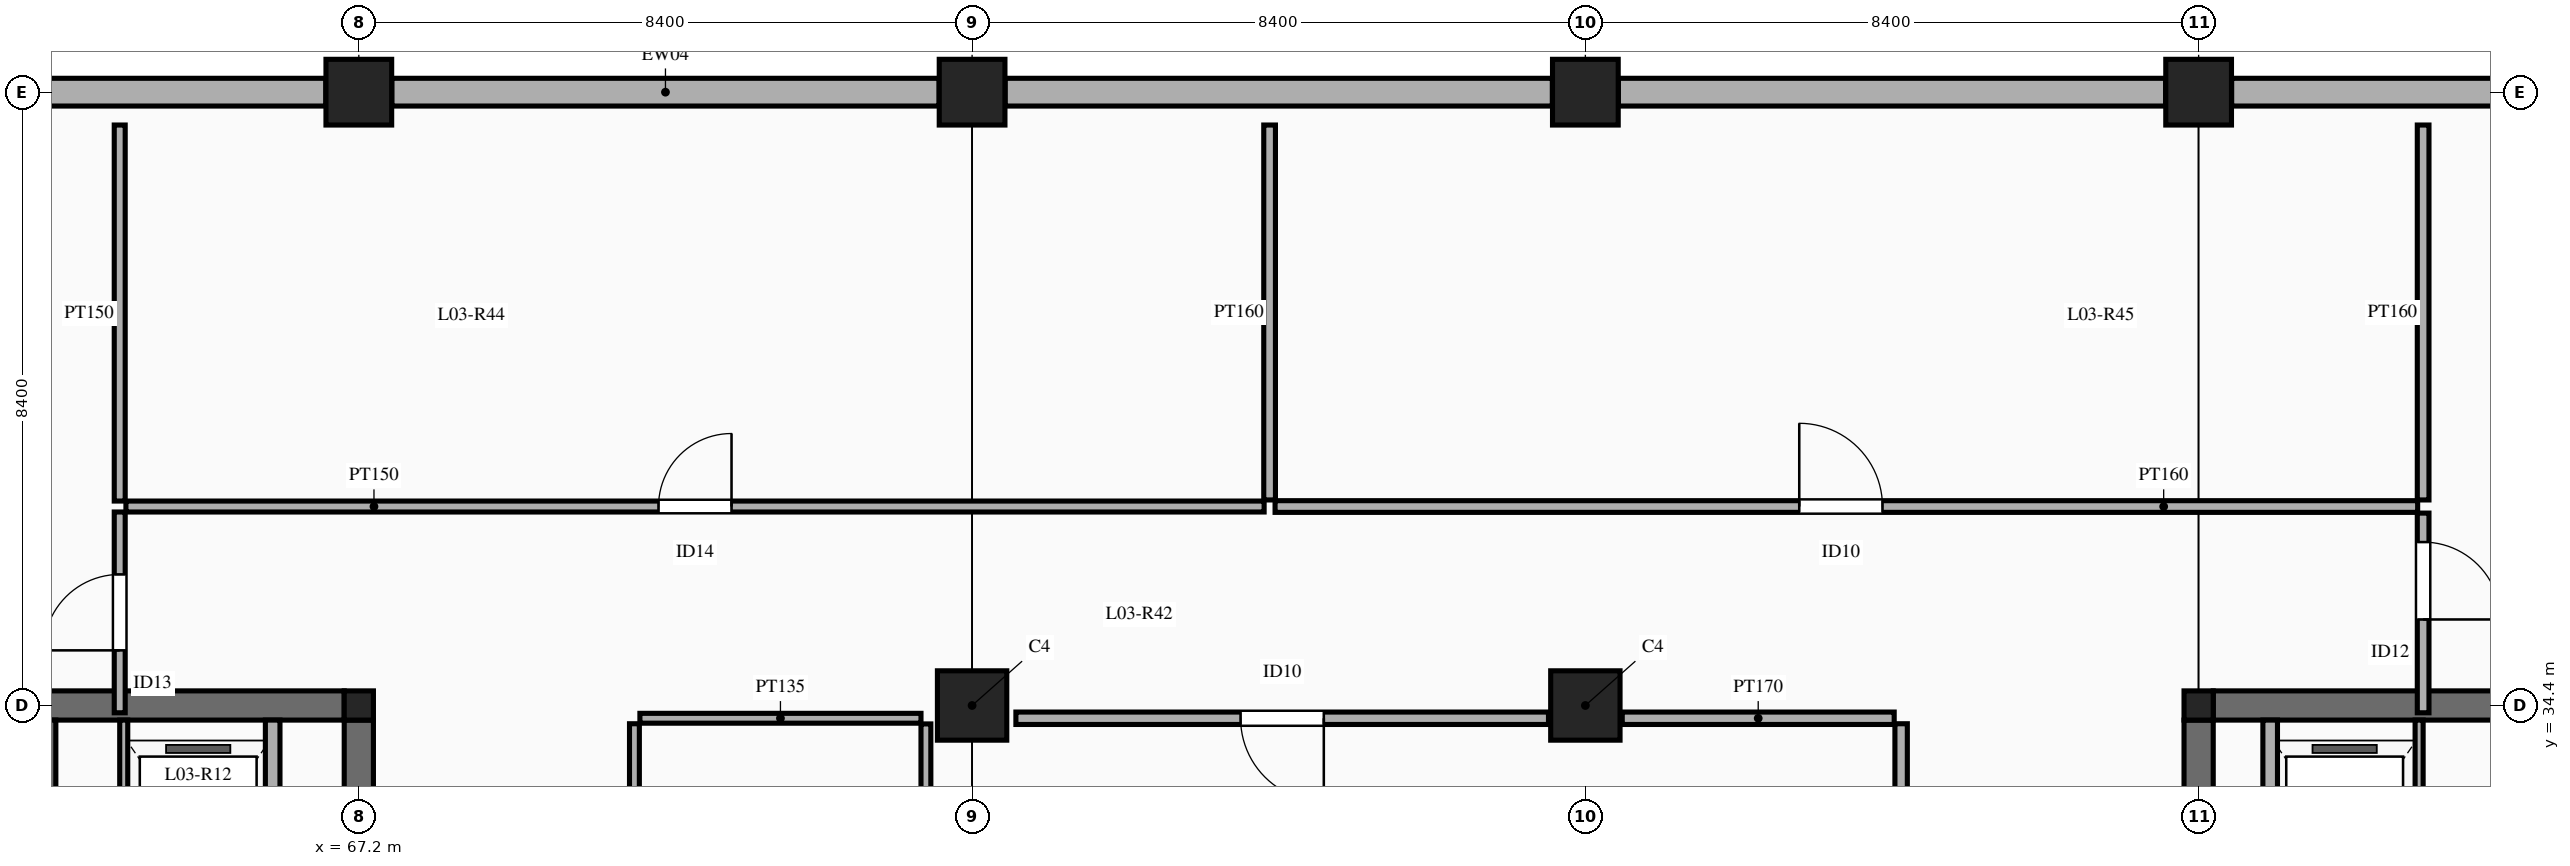
"""IFC4 building model, lengths in metres.
Left out: names, types, materials, properties, quantities, classifications, styles, units other than length and angle.
Written with IfcOpenShell. Run it as: python <this file> out.ifc"""

import sys

from ifc_helpers import new_model, si_unit, direction, frame, frame_2d, origin, origin_2d, place, context, subcontext, project, spatial, rectangle, extrude, element, fill, save


model = new_model("IFC4")
c1 = context("Model", 3, precision=1e-05, world=origin(), true_north=direction((0.0, 1.0)))
c2 = subcontext(c1, "Body", "Model", "MODEL_VIEW")
j1 = project(units=[si_unit("LENGTHUNIT", "METRE"), si_unit("PLANEANGLEUNIT", "RADIAN")], contexts=[c1])
p1 = place(None, origin())
s1 = spatial("IfcSite", under=j1, at=p1, CompositionType="ELEMENT")
p2 = place(p1, origin())
s2 = spatial("IfcBuilding", under=s1, at=p2, CompositionType="ELEMENT")
p3 = place(p2, frame((0.0, 0.0, 15.0)))
s3 = spatial("IfcBuildingStorey", under=s2, at=p3, CompositionType="ELEMENT", Elevation=15.0)
p4 = place(p3, frame((67.2, 34.4, 0.0), z_axis=(0.0, 0.0, 1.0), x_axis=(1.0, 0.0, 0.0)))
e1 = element("IfcColumn", 1, at=p4, inside=s3, PredefinedType="COLUMN", context=c2, shape_type="SweptSolid", body=[
    extrude(rectangle(XDim=0.4, YDim=0.4, at=origin_2d()), origin(), (0.0, 0.0, 1.0), 4.5),
])
p5 = place(p3, frame((67.2, 42.8, 0.0), z_axis=(0.0, 0.0, 1.0), x_axis=(1.0, 0.0, 0.0)))
e2 = element("IfcColumn", 2, at=p5, inside=s3, PredefinedType="COLUMN", context=c2, shape_type="SweptSolid", body=[
    extrude(rectangle(XDim=0.9, YDim=0.9, at=origin_2d()), origin(), (0.0, 0.0, 1.0), 4.5),
])
p6 = place(p3, frame((75.6, 34.4, 0.0), z_axis=(0.0, 0.0, 1.0), x_axis=(1.0, 0.0, 0.0)))
e3 = element("IfcColumn", 3, at=p6, inside=s3, PredefinedType="COLUMN", context=c2, shape_type="SweptSolid", body=[
    extrude(rectangle(XDim=0.95, YDim=0.95, at=origin_2d()), origin(), (0.0, 0.0, 1.0), 4.5),
])
p7 = place(p3, frame((75.6, 42.8, 0.0), z_axis=(0.0, 0.0, 1.0), x_axis=(1.0, 0.0, 0.0)))
e4 = element("IfcColumn", 4, at=p7, inside=s3, PredefinedType="COLUMN", context=c2, shape_type="SweptSolid", body=[
    extrude(rectangle(XDim=0.9, YDim=0.9, at=origin_2d()), origin(), (0.0, 0.0, 1.0), 4.5),
])
p8 = place(p3, frame((84.0, 34.4, 0.0), z_axis=(0.0, 0.0, 1.0), x_axis=(1.0, 0.0, 0.0)))
e5 = element("IfcColumn", 5, at=p8, inside=s3, PredefinedType="COLUMN", context=c2, shape_type="SweptSolid", body=[
    extrude(rectangle(XDim=0.95, YDim=0.95, at=origin_2d()), origin(), (0.0, 0.0, 1.0), 4.5),
])
p9 = place(p3, frame((84.0, 42.8, 0.0), z_axis=(0.0, 0.0, 1.0), x_axis=(1.0, 0.0, 0.0)))
e6 = element("IfcColumn", 6, at=p9, inside=s3, PredefinedType="COLUMN", context=c2, shape_type="SweptSolid", body=[
    extrude(rectangle(XDim=0.9, YDim=0.9, at=origin_2d()), origin(), (0.0, 0.0, 1.0), 4.5),
])
p10 = place(p3, frame((92.4, 34.4, 0.0), z_axis=(0.0, 0.0, 1.0), x_axis=(1.0, 0.0, 0.0)))
e7 = element("IfcColumn", 7, at=p10, inside=s3, PredefinedType="COLUMN", context=c2, shape_type="SweptSolid", body=[
    extrude(rectangle(XDim=0.4, YDim=0.4, at=origin_2d()), origin(), (0.0, 0.0, 1.0), 4.5),
])
p11 = place(p3, frame((92.4, 42.8, 0.0), z_axis=(0.0, 0.0, 1.0), x_axis=(1.0, 0.0, 0.0)))
e8 = element("IfcColumn", 8, at=p11, inside=s3, PredefinedType="COLUMN", context=c2, shape_type="SweptSolid", body=[
    extrude(rectangle(XDim=0.9, YDim=0.9, at=origin_2d()), origin(), (0.0, 0.0, 1.0), 4.5),
])
for number, where, z_axis, x_axis in (
    (9, (67.2, 26.2, 0.0), (0.0, 0.0, 1.0), (0.0, 1.0, 0.0)),
    (10, (59.0, 34.4, 0.0), (0.0, 0.0, 1.0), (1.0, 0.0, 0.0)),
    (11, (92.4, 26.2, 0.0), (0.0, 0.0, 1.0), (0.0, 1.0, 0.0)),
    (12, (92.6, 34.4, 0.0), (0.0, 0.0, 1.0), (1.0, 0.0, 0.0)),
):
    element("IfcWall", number, at=place(p3, frame(where, z_axis=z_axis, x_axis=x_axis)), inside=s3, PredefinedType="SHEAR", context=c2, shape_type="SweptSolid", body=[
        extrude(rectangle(XDim=8.0, YDim=0.4, at=frame_2d((4.0, 0.0))), origin(), (0.0, 0.0, 1.0), 4.5),
    ])
p12 = place(p3, frame((59.252, 42.8, 0.0), z_axis=(0.0, 0.0, 1.0), x_axis=(1.0, 0.0, 0.0)))
e13 = element("IfcWall", 13, at=p12, inside=s3, PredefinedType="SOLIDWALL", context=c2, shape_type="SweptSolid", body=[
    extrude(rectangle(XDim=7.496, YDim=0.38, at=frame_2d((3.748, 0.0))), origin(), (0.0, 0.0, 1.0), 3.55),
])
p13 = place(p3, frame((67.652, 42.8, 0.0), z_axis=(0.0, 0.0, 1.0), x_axis=(1.0, 0.0, 0.0)))
e14 = element("IfcWall", 14, at=p13, inside=s3, PredefinedType="SOLIDWALL", context=c2, shape_type="SweptSolid", body=[
    extrude(rectangle(XDim=7.496, YDim=0.38, at=frame_2d((3.748, 0.0))), origin(), (0.0, 0.0, 1.0), 3.55),
])
for number, where, z_axis, x_axis in (
    (15, (76.052, 42.8, 0.0), (0.0, 0.0, 1.0), (1.0, 0.0, 0.0)),
    (16, (84.452, 42.8, 0.0), (0.0, 0.0, 1.0), (1.0, 0.0, 0.0)),
):
    element("IfcWall", number, at=place(p3, frame(where, z_axis=z_axis, x_axis=x_axis)), inside=s3, PredefinedType="SOLIDWALL", context=c2, shape_type="SweptSolid", body=[
        extrude(rectangle(XDim=7.496, YDim=0.38, at=frame_2d((3.748, 0.0))), origin(), (0.0, 0.0, 1.0), 3.55),
    ])
p14 = place(p3, frame((92.852, 42.8, 0.0), z_axis=(0.0, 0.0, 1.0), x_axis=(1.0, 0.0, 0.0)))
e17 = element("IfcWall", 17, at=p14, inside=s3, PredefinedType="SOLIDWALL", context=c2, shape_type="SweptSolid", body=[
    extrude(rectangle(XDim=7.496, YDim=0.38, at=frame_2d((3.748, 0.0))), origin(), (0.0, 0.0, 1.0), 3.55),
])
p15 = place(p3, frame((62.95, 26.1, 0.0), z_axis=(0.0, 0.0, 1.0), x_axis=(0.0, 1.0, 0.0)))
e18 = element("IfcWall", 18, at=p15, inside=s3, PredefinedType="SOLIDWALL", context=c2, shape_type="SweptSolid", body=[
    extrude(rectangle(XDim=8.1, YDim=0.2, at=frame_2d((4.05, 0.0))), origin(), (0.0, 0.0, 1.0), 4.25),
])
p16 = place(p15, frame((0.45, 0.0, 0.0)))
e19 = element("IfcOpeningElement", 19, at=p16, cuts=e18, PredefinedType="OPENING", context=c2, shape_type="SweptSolid", body=[
    extrude(rectangle(XDim=1.12, YDim=2.15, at=frame_2d((0.56, 1.075))), frame((0.0, 0.11, 0.0), z_axis=(0.0, -1.0, 0.0), x_axis=(1.0, 0.0, 0.0)), (0.0, 0.0, 1.0), 0.22),
])
p17 = place(p3, frame((63.98, 31.15, 0.0), z_axis=(0.0, 0.0, 1.0), x_axis=(0.0, 1.0, 0.0)))
e20 = element("IfcWall", 20, at=p17, inside=s3, PredefinedType="PARTITIONING", context=c2, shape_type="SweptSolid", body=[
    extrude(rectangle(XDim=3.05, YDim=0.11, at=frame_2d((1.525, 0.0))), origin(), (0.0, 0.0, 1.0), 4.25),
])
p18 = place(p3, frame((66.02, 31.15, 0.0), z_axis=(0.0, 0.0, 1.0), x_axis=(0.0, 1.0, 0.0)))
e21 = element("IfcWall", 21, at=p18, inside=s3, PredefinedType="SOLIDWALL", context=c2, shape_type="SweptSolid", body=[
    extrude(rectangle(XDim=3.05, YDim=0.2, at=frame_2d((1.525, 0.0))), origin(), (0.0, 0.0, 1.0), 4.25),
])
p19 = place(p3, frame((95.42, 31.15, 0.0), z_axis=(0.0, 0.0, 1.0), x_axis=(0.0, 1.0, 0.0)))
e22 = element("IfcWall", 22, at=p19, inside=s3, PredefinedType="PARTITIONING", context=c2, shape_type="SweptSolid", body=[
    extrude(rectangle(XDim=3.05, YDim=0.11, at=frame_2d((1.525, 0.0))), origin(), (0.0, 0.0, 1.0), 4.25),
])
p20 = place(p3, frame((93.38, 31.15, 0.0), z_axis=(0.0, 0.0, 1.0), x_axis=(0.0, 1.0, 0.0)))
e23 = element("IfcWall", 23, at=p20, inside=s3, PredefinedType="SOLIDWALL", context=c2, shape_type="SweptSolid", body=[
    extrude(rectangle(XDim=3.05, YDim=0.2, at=frame_2d((1.525, 0.0))), origin(), (0.0, 0.0, 1.0), 4.25),
])
p21 = place(p3, frame((70.975, 30.25, 0.0), z_axis=(0.0, 0.0, 1.0), x_axis=(0.0, 1.0, 0.0)))
e24 = element("IfcWall", 24, at=p21, inside=s3, PredefinedType="PARTITIONING", context=c2, shape_type="SweptSolid", body=[
    extrude(rectangle(XDim=3.9, YDim=0.135, at=frame_2d((1.95, 0.0))), origin(), (0.0, 0.0, 1.0), 3.45),
])
p22 = place(p21, frame((1.46, 0.0, 0.0)))
e25 = element("IfcOpeningElement", 25, at=p22, cuts=e24, PredefinedType="OPENING", context=c2, shape_type="SweptSolid", body=[
    extrude(rectangle(XDim=0.98, YDim=2.15, at=frame_2d((0.49, 1.075))), frame((0.0, 0.077, 0.0), z_axis=(0.0, -1.0, 0.0), x_axis=(1.0, 0.0, 0.0)), (0.0, 0.0, 1.0), 0.155),
])
p23 = place(p3, frame((71.05, 34.225, 0.0), z_axis=(0.0, 0.0, 1.0), x_axis=(1.0, 0.0, 0.0)))
e26 = element("IfcWall", 26, at=p23, inside=s3, PredefinedType="PARTITIONING", context=c2, shape_type="SweptSolid", body=[
    extrude(rectangle(XDim=3.85, YDim=0.135, at=frame_2d((1.925, 0.0))), origin(), (0.0, 0.0, 1.0), 3.45),
])
p24 = place(p3, frame((88.325, 29.45, 0.0), z_axis=(0.0, 0.0, 1.0), x_axis=(0.0, 1.0, 0.0)))
e27 = element("IfcWall", 27, at=p24, inside=s3, PredefinedType="PARTITIONING", context=c2, shape_type="SweptSolid", body=[
    extrude(rectangle(XDim=4.7, YDim=0.17, at=frame_2d((2.35, 0.0))), origin(), (0.0, 0.0, 1.0), 3.45),
])
p25 = place(p3, frame((76.2, 34.225, 0.0), z_axis=(0.0, 0.0, 1.0), x_axis=(1.0, 0.0, 0.0)))
e28 = element("IfcWall", 28, at=p25, inside=s3, PredefinedType="PARTITIONING", context=c2, shape_type="SweptSolid", body=[
    extrude(rectangle(XDim=7.295, YDim=0.17, at=frame_2d((3.647, 0.0))), origin(), (0.0, 0.0, 1.0), 3.45),
])
p26 = place(p25, frame((3.077, 0.0, 0.0)))
e29 = element("IfcOpeningElement", 29, at=p26, cuts=e28, PredefinedType="OPENING", context=c2, shape_type="SweptSolid", body=[
    extrude(rectangle(XDim=1.14, YDim=2.22, at=frame_2d((0.57, 1.11))), frame((0.0, 0.095, 0.0), z_axis=(0.0, -1.0, 0.0), x_axis=(1.0, 0.0, 0.0)), (0.0, 0.0, 1.0), 0.19),
])
p27 = place(p3, frame((84.505, 34.225, 0.0), z_axis=(0.0, 0.0, 1.0), x_axis=(1.0, 0.0, 0.0)))
e30 = element("IfcWall", 30, at=p27, inside=s3, PredefinedType="PARTITIONING", context=c2, shape_type="SweptSolid", body=[
    extrude(rectangle(XDim=3.725, YDim=0.17, at=frame_2d((1.863, 0.0))), origin(), (0.0, 0.0, 1.0), 3.45),
])
p28 = place(p3, frame((63.925, 34.3, 0.0), z_axis=(0.0, 0.0, 1.0), x_axis=(0.0, 1.0, 0.0)))
e31 = element("IfcWall", 31, at=p28, inside=s3, PredefinedType="PARTITIONING", context=c2, shape_type="SweptSolid", body=[
    extrude(rectangle(XDim=2.75, YDim=0.15, at=frame_2d((1.375, 0.0))), origin(), (0.0, 0.0, 1.0), 3.45),
])
p29 = place(p28, frame((0.855, 0.0, 0.0)))
e32 = element("IfcOpeningElement", 32, at=p29, cuts=e31, PredefinedType="OPENING", context=c2, shape_type="SweptSolid", body=[
    extrude(rectangle(XDim=1.04, YDim=2.15, at=frame_2d((0.52, 1.075))), frame((0.0, 0.085, 0.0), z_axis=(0.0, -1.0, 0.0), x_axis=(1.0, 0.0, 0.0)), (0.0, 0.0, 1.0), 0.17),
])
p30 = place(p3, frame((64.01, 37.125, 0.0), z_axis=(0.0, 0.0, 1.0), x_axis=(1.0, 0.0, 0.0)))
e33 = element("IfcWall", 33, at=p30, inside=s3, PredefinedType="PARTITIONING", context=c2, shape_type="SweptSolid", body=[
    extrude(rectangle(XDim=15.59, YDim=0.15, at=frame_2d((7.795, 0.0))), origin(), (0.0, 0.0, 1.0), 3.45),
])
p31 = place(p30, frame((7.295, 0.0, 0.0)))
e34 = element("IfcOpeningElement", 34, at=p31, cuts=e33, PredefinedType="OPENING", context=c2, shape_type="SweptSolid", body=[
    extrude(rectangle(XDim=1.0, YDim=2.15, at=frame_2d((0.5, 1.075))), frame((0.0, 0.085, 0.0), z_axis=(0.0, -1.0, 0.0), x_axis=(1.0, 0.0, 0.0)), (0.0, 0.0, 1.0), 0.17),
])
p32 = place(p3, frame((79.75, 37.125, 0.0), z_axis=(0.0, 0.0, 1.0), x_axis=(1.0, 0.0, 0.0)))
e35 = element("IfcWall", 35, at=p32, inside=s3, PredefinedType="PARTITIONING", context=c2, shape_type="SweptSolid", body=[
    extrude(rectangle(XDim=15.65, YDim=0.16, at=frame_2d((7.825, 0.0))), origin(), (0.0, 0.0, 1.0), 3.45),
])
p33 = place(p32, frame((7.18, 0.0, 0.0)))
e36 = element("IfcOpeningElement", 36, at=p33, cuts=e35, PredefinedType="OPENING", context=c2, shape_type="SweptSolid", body=[
    extrude(rectangle(XDim=1.14, YDim=2.22, at=frame_2d((0.57, 1.11))), frame((0.0, 0.09, 0.0), z_axis=(0.0, -1.0, 0.0), x_axis=(1.0, 0.0, 0.0)), (0.0, 0.0, 1.0), 0.18),
])
p34 = place(p3, frame((95.475, 34.3, 0.0), z_axis=(0.0, 0.0, 1.0), x_axis=(0.0, 1.0, 0.0)))
e37 = element("IfcWall", 37, at=p34, inside=s3, PredefinedType="PARTITIONING", context=c2, shape_type="SweptSolid", body=[
    extrude(rectangle(XDim=2.735, YDim=0.16, at=frame_2d((1.367, 0.0))), origin(), (0.0, 0.0, 1.0), 3.45),
])
p35 = place(p34, frame((1.278, 0.0, 0.0)))
e38 = element("IfcOpeningElement", 38, at=p35, cuts=e37, PredefinedType="OPENING", context=c2, shape_type="SweptSolid", body=[
    extrude(rectangle(XDim=1.06, YDim=2.18, at=frame_2d((0.53, 1.09))), frame((0.0, 0.09, 0.0), z_axis=(0.0, -1.0, 0.0), x_axis=(1.0, 0.0, 0.0)), (0.0, 0.0, 1.0), 0.18),
])
p36 = place(p3, frame((63.925, 37.2, 0.0), z_axis=(0.0, 0.0, 1.0), x_axis=(0.0, 1.0, 0.0)))
e39 = element("IfcWall", 39, at=p36, inside=s3, PredefinedType="PARTITIONING", context=c2, shape_type="SweptSolid", body=[
    extrude(rectangle(XDim=5.15, YDim=0.15, at=frame_2d((2.575, 0.0))), origin(), (0.0, 0.0, 1.0), 3.45),
])
for number, where, z_axis, x_axis in (
    (40, (79.675, 37.215, 0.0), (0.0, 0.0, 1.0), (0.0, 1.0, 0.0)),
    (41, (95.475, 37.215, 0.0), (0.0, 0.0, 1.0), (0.0, 1.0, 0.0)),
):
    element("IfcWall", number, at=place(p3, frame(where, z_axis=z_axis, x_axis=x_axis)), inside=s3, PredefinedType="PARTITIONING", context=c2, shape_type="SweptSolid", body=[
        extrude(rectangle(XDim=5.135, YDim=0.16, at=frame_2d((2.567, 0.0))), origin(), (0.0, 0.0, 1.0), 3.45),
    ])
p37 = place(p3, frame((74.968, 30.252, 0.0), z_axis=(0.0, 0.0, 1.0), x_axis=(0.0, 1.0, 0.0)))
e42 = element("IfcWall", 42, at=p37, inside=s3, PredefinedType="PARTITIONING", context=c2, shape_type="SweptSolid", body=[
    extrude(rectangle(XDim=3.895, YDim=0.135, at=frame_2d((1.948, 0.0))), origin(), (0.0, 0.0, 1.0), 3.45),
])
p38 = place(p26, frame((1.14, 0.0, 0.0), z_axis=(0.0, 0.0, 1.0), x_axis=(-1.0, 0.0, 0.0)))
e43 = element("IfcDoor", 43, at=p38, inside=s3, OperationType="SINGLE_SWING_LEFT", PredefinedType="DOOR", context=c2, shape_type="SweptSolid", body=[
    extrude(rectangle(XDim=1.14, YDim=2.22, at=frame_2d((0.57, 1.11))), frame((0.0, 0.025, 0.0), z_axis=(0.0, -1.0, 0.0), x_axis=(1.0, 0.0, 0.0)), (0.0, 0.0, 1.0), 0.05),
])
fill(e29, e43)
p39 = place(p29, origin())
e44 = element("IfcDoor", 44, at=p39, inside=s3, OperationType="SINGLE_SWING_LEFT", PredefinedType="DOOR", context=c2, shape_type="SweptSolid", body=[
    extrude(rectangle(XDim=1.04, YDim=2.15, at=frame_2d((0.52, 1.075))), frame((0.0, 0.025, 0.0), z_axis=(0.0, -1.0, 0.0), x_axis=(1.0, 0.0, 0.0)), (0.0, 0.0, 1.0), 0.05),
])
fill(e32, e44)
p40 = place(p31, origin())
e45 = element("IfcDoor", 45, at=p40, inside=s3, OperationType="SINGLE_SWING_RIGHT", PredefinedType="DOOR", context=c2, shape_type="SweptSolid", body=[
    extrude(rectangle(XDim=1.0, YDim=2.15, at=frame_2d((0.5, 1.075))), frame((0.0, 0.025, 0.0), z_axis=(0.0, -1.0, 0.0), x_axis=(1.0, 0.0, 0.0)), (0.0, 0.0, 1.0), 0.05),
])
fill(e34, e45)
p41 = place(p33, origin())
e46 = element("IfcDoor", 46, at=p41, inside=s3, OperationType="SINGLE_SWING_LEFT", PredefinedType="DOOR", context=c2, shape_type="SweptSolid", body=[
    extrude(rectangle(XDim=1.14, YDim=2.22, at=frame_2d((0.57, 1.11))), frame((0.0, 0.025, 0.0), z_axis=(0.0, -1.0, 0.0), x_axis=(1.0, 0.0, 0.0)), (0.0, 0.0, 1.0), 0.05),
])
fill(e36, e46)
p42 = place(p35, frame((1.06, 0.0, 0.0), z_axis=(0.0, 0.0, 1.0), x_axis=(-1.0, 0.0, 0.0)))
e47 = element("IfcDoor", 47, at=p42, inside=s3, OperationType="SINGLE_SWING_RIGHT", PredefinedType="DOOR", context=c2, shape_type="SweptSolid", body=[
    extrude(rectangle(XDim=1.06, YDim=2.18, at=frame_2d((0.53, 1.09))), frame((0.0, 0.025, 0.0), z_axis=(0.0, -1.0, 0.0), x_axis=(1.0, 0.0, 0.0)), (0.0, 0.0, 1.0), 0.05),
])
fill(e38, e47)
save(model, sys.argv[1])
